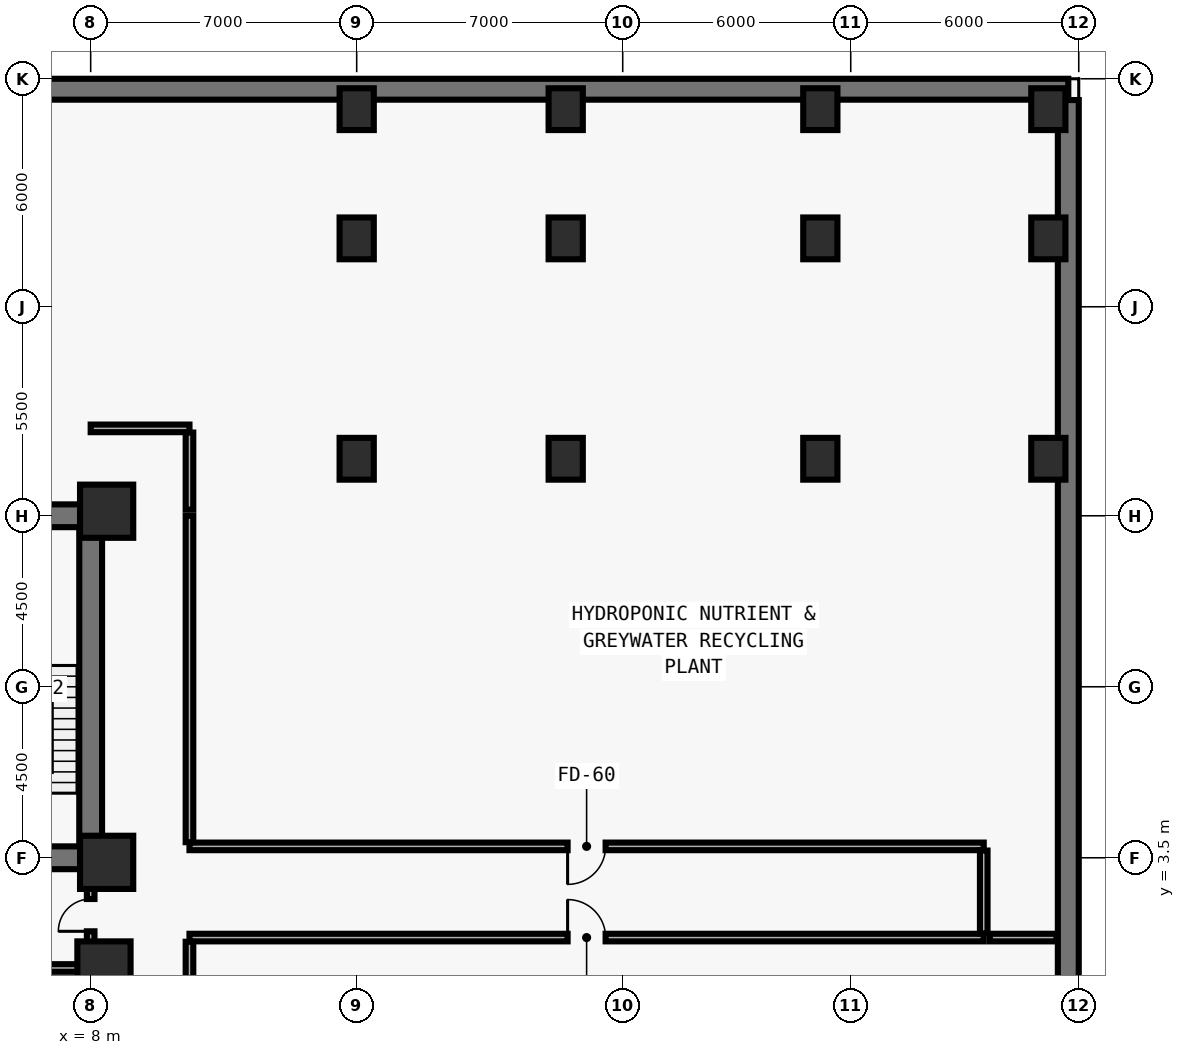
"""IFC4 building model, lengths in metres.
Left out: names, types, materials, properties, quantities, classifications, styles, units other than length and angle.
Written with IfcOpenShell. Run it as: python <this file> out.ifc"""

import sys

from ifc_helpers import new_model, si_unit, direction, frame, frame_2d, origin, origin_2d, place, context, subcontext, project, spatial, rectangle, extrude, element, fill, save


model = new_model("IFC4")
c1 = context("Model", 3, precision=1e-05, world=origin(), true_north=direction((0.0, 1.0)))
c2 = subcontext(c1, "Body", "Model", "MODEL_VIEW")
j1 = project(units=[si_unit("LENGTHUNIT", "METRE"), si_unit("PLANEANGLEUNIT", "RADIAN")], contexts=[c1])
p1 = place(None, origin())
s1 = spatial("IfcSite", under=j1, at=p1, CompositionType="ELEMENT")
p2 = place(p1, origin())
s2 = spatial("IfcBuilding", under=s1, at=p2, CompositionType="ELEMENT")
p3 = place(p2, frame((0.0, 0.0, -13.5)))
s3 = spatial("IfcBuildingStorey", under=s2, at=p3, CompositionType="ELEMENT", Elevation=-13.5)
p4 = place(p3, frame((-2.0, 3.5, 0.0), z_axis=(0.0, 0.0, 1.0), x_axis=(1.0, 0.0, 0.0)))
e1 = element("IfcWall", 1, at=p4, inside=s3, PredefinedType="SHEAR", context=c2, shape_type="SweptSolid", body=[
    extrude(rectangle(XDim=10.0, YDim=0.6, at=frame_2d((5.0, 0.0))), origin(), (0.0, 0.0, 1.0), 4.492),
])
p5 = place(p4, frame((1.65, 0.0, 0.0)))
e2 = element("IfcOpeningElement", 2, at=p5, cuts=e1, PredefinedType="OPENING", context=c2, shape_type="SweptSolid", body=[
    extrude(rectangle(XDim=1.1, YDim=2.15, at=frame_2d((0.55, 1.075))), frame((0.0, 0.31, 0.0), z_axis=(0.0, -1.0, 0.0), x_axis=(1.0, 0.0, 0.0)), (0.0, 0.0, 1.0), 0.62),
])
p6 = place(p4, frame((7.65, 0.0, 0.0)))
e3 = element("IfcOpeningElement", 3, at=p6, cuts=e1, PredefinedType="OPENING", context=c2, shape_type="SweptSolid", body=[
    extrude(rectangle(XDim=1.1, YDim=2.15, at=frame_2d((0.55, 1.075))), frame((0.0, 0.31, 0.0), z_axis=(0.0, -1.0, 0.0), x_axis=(1.0, 0.0, 0.0)), (0.0, 0.0, 1.0), 0.62),
])
p7 = place(p4, frame((3.72, 0.0, 0.0)))
e4 = element("IfcOpeningElement", 4, at=p7, cuts=e1, PredefinedType="OPENING", context=c2, shape_type="SweptSolid", body=[
    extrude(rectangle(XDim=1.1, YDim=2.2, at=frame_2d((0.55, 1.1))), frame((0.0, 0.31, 0.0), z_axis=(0.0, -1.0, 0.0), x_axis=(1.0, 0.0, 0.0)), (0.0, 0.0, 1.0), 0.62),
])
p8 = place(p4, frame((5.18, 0.0, 0.0)))
e5 = element("IfcOpeningElement", 5, at=p8, cuts=e1, PredefinedType="OPENING", context=c2, shape_type="SweptSolid", body=[
    extrude(rectangle(XDim=1.1, YDim=2.2, at=frame_2d((0.55, 1.1))), frame((0.0, 0.31, 0.0), z_axis=(0.0, -1.0, 0.0), x_axis=(1.0, 0.0, 0.0)), (0.0, 0.0, 1.0), 0.62),
])
p9 = place(p3, frame((-2.0, 12.5, 0.0), z_axis=(0.0, 0.0, 1.0), x_axis=(1.0, 0.0, 0.0)))
e6 = element("IfcWall", 6, at=p9, inside=s3, PredefinedType="SHEAR", context=c2, shape_type="SweptSolid", body=[
    extrude(rectangle(XDim=10.0, YDim=0.6, at=frame_2d((5.0, 0.0))), origin(), (0.0, 0.0, 1.0), 4.492),
])
p10 = place(p9, frame((4.45, 0.0, 0.0)))
e7 = element("IfcOpeningElement", 7, at=p10, cuts=e6, PredefinedType="OPENING", context=c2, shape_type="SweptSolid", body=[
    extrude(rectangle(XDim=0.85, YDim=2.1, at=frame_2d((0.425, 1.05))), frame((0.0, 0.31, 0.0), z_axis=(0.0, -1.0, 0.0), x_axis=(1.0, 0.0, 0.0)), (0.0, 0.0, 1.0), 0.62),
])
p11 = place(p3, frame((8.0, 3.81, 0.0), z_axis=(0.0, 0.0, 1.0), x_axis=(0.0, 1.0, 0.0)))
e8 = element("IfcWall", 8, at=p11, inside=s3, PredefinedType="SHEAR", context=c2, shape_type="SweptSolid", body=[
    extrude(rectangle(XDim=8.38, YDim=0.6, at=frame_2d((4.19, 0.0))), origin(), (0.0, 0.0, 1.0), 4.492),
])
p12 = place(p3, frame((-33.725, 23.725, 0.0), z_axis=(0.0, 0.0, 1.0), x_axis=(1.0, 0.0, 0.0)))
e9 = element("IfcWall", 9, at=p12, inside=s3, PredefinedType="SOLIDWALL", context=c2, shape_type="SweptSolid", body=[
    extrude(rectangle(XDim=67.45, YDim=0.55, at=frame_2d((33.725, 0.0))), origin(), (0.0, 0.0, 1.0), 4.492),
])
p13 = place(p3, frame((33.725, -23.44, 0.0), z_axis=(0.0, 0.0, 1.0), x_axis=(0.0, 1.0, 0.0)))
e10 = element("IfcWall", 10, at=p13, inside=s3, PredefinedType="SOLIDWALL", context=c2, shape_type="SweptSolid", body=[
    extrude(rectangle(XDim=46.88, YDim=0.55, at=frame_2d((23.44, 0.0))), origin(), (0.0, 0.0, 1.0), 4.492),
])
for number, where, z_axis, x_axis in (
    (11, (8.42, 12.62, 0.0), (0.0, 0.0, 1.0), (1.0, 0.0, 0.0)),
    (12, (8.42, 3.38, 0.0), (0.0, 0.0, 1.0), (1.0, 0.0, 0.0)),
    (13, (8.35, 0.6, 0.0), (0.0, 0.0, 1.0), (1.0, 0.0, 0.0)),
):
    element("IfcColumn", number, at=place(p3, frame(where, z_axis=z_axis, x_axis=x_axis)), inside=s3, PredefinedType="COLUMN", context=c2, shape_type="SweptSolid", body=[
        extrude(rectangle(XDim=1.4, YDim=1.4, at=origin_2d()), origin(), (0.0, 0.0, 1.0), 4.475),
    ])
for number, where, z_axis, x_axis in (
    (14, (15.0, 14.0, 0.0), (0.0, 0.0, 1.0), (1.0, 0.0, 0.0)),
    (15, (15.0, 19.8, 0.0), (0.0, 0.0, 1.0), (1.0, 0.0, 0.0)),
    (16, (15.0, 23.2, 0.0), (0.0, 0.0, 1.0), (1.0, 0.0, 0.0)),
    (17, (20.5, 14.0, 0.0), (0.0, 0.0, 1.0), (1.0, 0.0, 0.0)),
    (18, (20.5, 19.8, 0.0), (0.0, 0.0, 1.0), (1.0, 0.0, 0.0)),
    (19, (20.5, 23.2, 0.0), (0.0, 0.0, 1.0), (1.0, 0.0, 0.0)),
    (20, (27.2, 14.0, 0.0), (0.0, 0.0, 1.0), (1.0, 0.0, 0.0)),
    (21, (27.2, 19.8, 0.0), (0.0, 0.0, 1.0), (1.0, 0.0, 0.0)),
    (22, (27.2, 23.2, 0.0), (0.0, 0.0, 1.0), (1.0, 0.0, 0.0)),
    (23, (33.2, 14.0, 0.0), (0.0, 0.0, 1.0), (1.0, 0.0, 0.0)),
    (24, (33.2, 19.8, 0.0), (0.0, 0.0, 1.0), (1.0, 0.0, 0.0)),
    (25, (33.2, 23.2, 0.0), (0.0, 0.0, 1.0), (1.0, 0.0, 0.0)),
):
    element("IfcColumn", number, at=place(p3, frame(where, z_axis=z_axis, x_axis=x_axis)), inside=s3, PredefinedType="COLUMN", context=c2, shape_type="SweptSolid", body=[
        extrude(rectangle(XDim=0.9, YDim=1.1, at=origin_2d()), origin(), (0.0, 0.0, 1.0), 4.475),
    ])
p14 = place(p3, frame((4.0, 0.6, 0.0), z_axis=(0.0, 0.0, 1.0), x_axis=(1.0, 0.0, 0.0)))
e26 = element("IfcWall", 26, at=p14, inside=s3, PredefinedType="SOLIDWALL", context=c2, shape_type="SweptSolid", body=[
    extrude(rectangle(XDim=3.88, YDim=0.2, at=frame_2d((1.94, 0.0))), origin(), (0.0, 0.0, 1.0), 3.362),
])
p15 = place(p3, frame((8.0, 0.72, 0.0), z_axis=(0.0, 0.0, 1.0), x_axis=(0.0, 1.0, 0.0)))
e27 = element("IfcWall", 27, at=p15, inside=s3, PredefinedType="MOVABLE", context=c2, shape_type="SweptSolid", body=[
    extrude(rectangle(XDim=2.25, YDim=0.2, at=frame_2d((1.125, 0.0))), origin(), (0.0, 0.0, 1.0), 3.262),
])
p16 = place(p15, frame((0.845, 0.0, 0.0)))
e28 = element("IfcOpeningElement", 28, at=p16, cuts=e27, PredefinedType="OPENING", context=c2, shape_type="SweptSolid", body=[
    extrude(rectangle(XDim=0.85, YDim=2.1, at=frame_2d((0.425, 1.05))), frame((0.0, 0.11, 0.0), z_axis=(0.0, -1.0, 0.0), x_axis=(1.0, 0.0, 0.0)), (0.0, 0.0, 1.0), 0.22),
])
p17 = place(p3, frame((10.6, 1.4, 0.0), z_axis=(0.0, 0.0, 1.0), x_axis=(1.0, 0.0, 0.0)))
e29 = element("IfcWall", 29, at=p17, inside=s3, PredefinedType="MOVABLE", context=c2, shape_type="SweptSolid", body=[
    extrude(rectangle(XDim=20.9, YDim=0.2, at=frame_2d((10.45, 0.0))), origin(), (0.0, 0.0, 1.0), 4.18),
])
p18 = place(p17, frame((9.95, 0.0, 0.0)))
e30 = element("IfcOpeningElement", 30, at=p18, cuts=e29, PredefinedType="OPENING", context=c2, shape_type="SweptSolid", body=[
    extrude(rectangle(XDim=1.0, YDim=2.1, at=frame_2d((0.5, 1.05))), frame((0.0, 0.11, 0.0), z_axis=(0.0, -1.0, 0.0), x_axis=(1.0, 0.0, 0.0)), (0.0, 0.0, 1.0), 0.22),
])
p19 = place(p3, frame((31.5, 3.8, 0.0), z_axis=(0.0, 0.0, 1.0), x_axis=(-1.0, 0.0, 0.0)))
e31 = element("IfcWall", 31, at=p19, inside=s3, PredefinedType="MOVABLE", context=c2, shape_type="SweptSolid", body=[
    extrude(rectangle(XDim=20.9, YDim=0.2, at=frame_2d((10.45, 0.0))), origin(), (0.0, 0.0, 1.0), 4.18),
])
p20 = place(p19, frame((9.95, 0.0, 0.0)))
e32 = element("IfcOpeningElement", 32, at=p20, cuts=e31, PredefinedType="OPENING", context=c2, shape_type="SweptSolid", body=[
    extrude(rectangle(XDim=1.0, YDim=2.1, at=frame_2d((0.5, 1.05))), frame((0.0, 0.11, 0.0), z_axis=(0.0, -1.0, 0.0), x_axis=(1.0, 0.0, 0.0)), (0.0, 0.0, 1.0), 0.22),
])
p21 = place(p3, frame((8.0, -4.09, 0.0), z_axis=(0.0, 0.0, 1.0), x_axis=(0.0, 1.0, 0.0)))
e33 = element("IfcWall", 33, at=p21, inside=s3, PredefinedType="MOVABLE", context=c2, shape_type="SweptSolid", body=[
    extrude(rectangle(XDim=4.59, YDim=0.2, at=frame_2d((2.295, 0.0))), origin(), (0.0, 0.0, 1.0), 3.362),
])
p22 = place(p3, frame((10.6, -4.2, 0.0), z_axis=(0.0, 0.0, 1.0), x_axis=(0.0, 1.0, 0.0)))
e34 = element("IfcWall", 34, at=p22, inside=s3, PredefinedType="MOVABLE", context=c2, shape_type="SweptSolid", body=[
    extrude(rectangle(XDim=5.49, YDim=0.2, at=frame_2d((2.745, 0.0))), origin(), (0.0, 0.0, 1.0), 4.18),
])
p23 = place(p3, frame((10.6, 3.91, 0.0), z_axis=(0.0, 0.0, 1.0), x_axis=(0.0, 1.0, 0.0)))
e35 = element("IfcWall", 35, at=p23, inside=s3, PredefinedType="MOVABLE", context=c2, shape_type="SweptSolid", body=[
    extrude(rectangle(XDim=8.59, YDim=0.2, at=frame_2d((4.295, 0.0))), origin(), (0.0, 0.0, 1.0), 4.18),
])
p24 = place(p3, frame((10.6, 14.8, 0.0), z_axis=(0.0, 0.0, 1.0), x_axis=(-1.0, 0.0, 0.0)))
e36 = element("IfcWall", 36, at=p24, inside=s3, PredefinedType="MOVABLE", context=c2, shape_type="SweptSolid", body=[
    extrude(rectangle(XDim=2.6, YDim=0.2, at=frame_2d((1.3, 0.0))), origin(), (0.0, 0.0, 1.0), 4.18),
])
p25 = place(p3, frame((31.5, 1.51, 0.0), z_axis=(0.0, 0.0, 1.0), x_axis=(0.0, 1.0, 0.0)))
e37 = element("IfcWall", 37, at=p25, inside=s3, PredefinedType="MOVABLE", context=c2, shape_type="SweptSolid", body=[
    extrude(rectangle(XDim=2.18, YDim=0.2, at=frame_2d((1.09, 0.0))), origin(), (0.0, 0.0, 1.0), 4.18),
])
p26 = place(p3, frame((10.6, 12.66, 0.0), z_axis=(0.0, 0.0, 1.0), x_axis=(0.0, 1.0, 0.0)))
e38 = element("IfcWall", 38, at=p26, inside=s3, PredefinedType="MOVABLE", context=c2, shape_type="SweptSolid", body=[
    extrude(rectangle(XDim=2.03, YDim=0.2, at=frame_2d((1.015, 0.0))), origin(), (0.0, 0.0, 1.0), 4.18),
])
p27 = place(p3, frame((31.66, 1.4, 0.0), z_axis=(0.0, 0.0, 1.0), x_axis=(1.0, 0.0, 0.0)))
e39 = element("IfcWall", 39, at=p27, inside=s3, PredefinedType="MOVABLE", context=c2, shape_type="SweptSolid", body=[
    extrude(rectangle(XDim=1.755, YDim=0.2, at=frame_2d((0.877, 0.0))), origin(), (0.0, 0.0, 1.0), 4.18),
])
p28 = place(p16, origin())
e40 = element("IfcDoor", 40, at=p28, inside=s3, OperationType="SINGLE_SWING_LEFT", PredefinedType="DOOR", context=c2, shape_type="SweptSolid", body=[
    extrude(rectangle(XDim=0.85, YDim=2.1, at=frame_2d((0.425, 1.05))), frame((0.0, 0.025, 0.0), z_axis=(0.0, -1.0, 0.0), x_axis=(1.0, 0.0, 0.0)), (0.0, 0.0, 1.0), 0.05),
])
fill(e28, e40)
p29 = place(p18, origin())
e41 = element("IfcDoor", 41, at=p29, inside=s3, OperationType="SINGLE_SWING_LEFT", PredefinedType="DOOR", context=c2, shape_type="SweptSolid", body=[
    extrude(rectangle(XDim=1.0, YDim=2.1, at=frame_2d((0.5, 1.05))), frame((0.0, 0.025, 0.0), z_axis=(0.0, -1.0, 0.0), x_axis=(1.0, 0.0, 0.0)), (0.0, 0.0, 1.0), 0.05),
])
fill(e30, e41)
p30 = place(p20, origin())
e42 = element("IfcDoor", 42, at=p30, inside=s3, OperationType="SINGLE_SWING_RIGHT", PredefinedType="DOOR", context=c2, shape_type="SweptSolid", body=[
    extrude(rectangle(XDim=1.0, YDim=2.1, at=frame_2d((0.5, 1.05))), frame((0.0, 0.025, 0.0), z_axis=(0.0, -1.0, 0.0), x_axis=(1.0, 0.0, 0.0)), (0.0, 0.0, 1.0), 0.05),
])
fill(e32, e42)
save(model, sys.argv[1])
